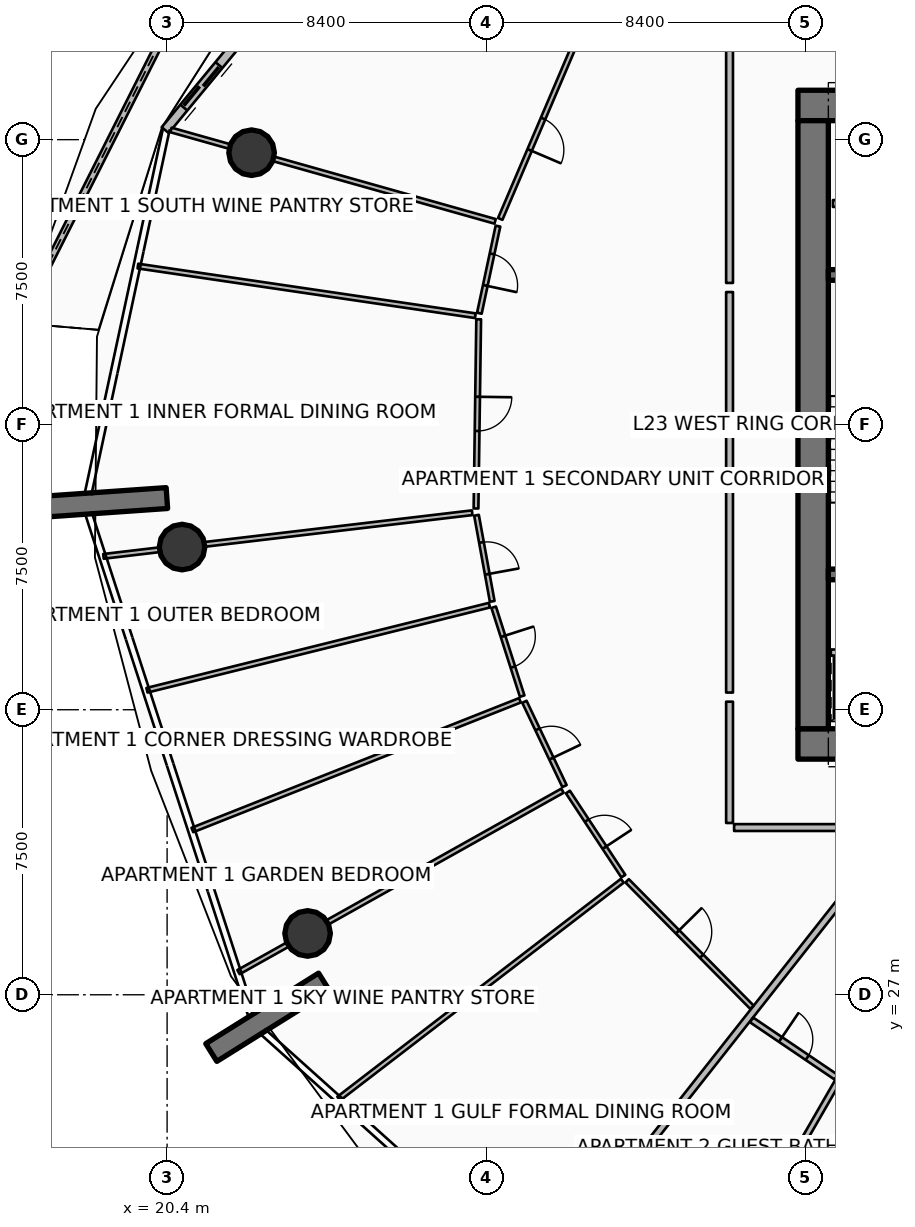
"""IFC4 building model, lengths in metres.
Left out: names, types, materials, properties, quantities, classifications, styles, units other than length and angle.
Written with IfcOpenShell. Run it as: python <this file> out.ifc"""

import sys

from ifc_helpers import new_model, si_unit, direction, frame, frame_2d, origin, origin_2d, place, context, subcontext, project, spatial, polyline, rectangle, circle, outline, extrude, element, fill, save


model = new_model("IFC4")
c1 = context("Model", 3, precision=1e-05, world=origin(), true_north=direction((0.0, 1.0)))
c2 = subcontext(c1, "Body", "Model", "MODEL_VIEW")
j1 = project(units=[si_unit("LENGTHUNIT", "METRE"), si_unit("PLANEANGLEUNIT", "RADIAN")], contexts=[c1])
p1 = place(None, origin())
s1 = spatial("IfcSite", under=j1, at=p1, CompositionType="ELEMENT")
p2 = place(p1, origin())
s2 = spatial("IfcBuilding", under=s1, at=p2, CompositionType="ELEMENT")
p3 = place(p2, frame((0.0, 0.0, 93.9)))
s3 = spatial("IfcBuildingStorey", under=s2, at=p3, CompositionType="ELEMENT", Elevation=93.9)
for number, where, z_axis, x_axis in (
    (1, (37.0, 33.6, 0.0), (0.0, 0.0, 1.0), (1.0, 0.0, 0.0)),
    (2, (37.0, 50.4, 0.0), (0.0, 0.0, 1.0), (1.0, 0.0, 0.0)),
):
    element("IfcWall", number, at=place(p3, frame(where, z_axis=z_axis, x_axis=x_axis)), inside=s3, PredefinedType="SHEAR", context=c2, shape_type="SweptSolid", body=[
        extrude(rectangle(XDim=9.9, YDim=0.8, at=frame_2d((4.95, 0.0))), origin(), (0.0, 0.0, 1.0), 3.75),
    ])
p4 = place(p3, frame((37.4, 34.0, 0.0), z_axis=(0.0, 0.0, 1.0), x_axis=(0.0, 1.0, 0.0)))
e3 = element("IfcWall", 3, at=p4, inside=s3, PredefinedType="SHEAR", context=c2, shape_type="SweptSolid", body=[
    extrude(rectangle(XDim=16.0, YDim=0.8, at=frame_2d((8.0, 0.0))), origin(), (0.0, 0.0, 1.0), 3.75),
])
for number, where, z_axis, x_axis in (
    (4, (37.8, 38.06, 0.0), (0.0, 0.0, 1.0), (1.0, 0.0, 0.0)),
    (5, (37.8, 45.94, 0.0), (0.0, 0.0, 1.0), (1.0, 0.0, 0.0)),
):
    element("IfcWall", number, at=place(p3, frame(where, z_axis=z_axis, x_axis=x_axis)), inside=s3, PredefinedType="SHEAR", context=c2, shape_type="SweptSolid", body=[
        extrude(rectangle(XDim=3.5, YDim=0.28, at=frame_2d((1.75, 0.0))), origin(), (0.0, 0.0, 1.0), 3.75),
    ])
for number, where, z_axis, x_axis in (
    (6, (20.394, 40.07, 0.0), (0.0, 0.0, 1.0), (-0.998, -0.07, 0.0)),
    (7, (24.531, 27.335, 0.0), (0.0, 0.0, 1.0), (-0.848, -0.53, 0.0)),
):
    element("IfcWall", number, at=place(p3, frame(where, z_axis=z_axis, x_axis=x_axis)), inside=s3, PredefinedType="SOLIDWALL", context=c2, shape_type="SweptSolid", body=[
        extrude(rectangle(XDim=3.5, YDim=0.55, at=frame_2d((1.75, 0.0))), origin(), (0.0, 0.0, 1.0), 3.75),
    ])
for number, where, z_axis, x_axis in (
    (8, (22.623, 49.157, 0.0), (0.0, 0.0, 1.0), (1.0, 0.0, 0.0)),
    (9, (20.793, 38.78, 0.0), (0.0, 0.0, 1.0), (1.0, 0.0, 0.0)),
    (10, (24.097, 28.614, 0.0), (0.0, 0.0, 1.0), (1.0, 0.0, 0.0)),
):
    element("IfcColumn", number, at=place(p3, frame(where, z_axis=z_axis, x_axis=x_axis)), inside=s3, PredefinedType="COLUMN", context=c2, shape_type="SweptSolid", body=[
        extrude(circle(Radius=0.6, at=origin_2d()), origin(), (0.0, 0.0, 1.0), 3.5),
    ])
p5 = place(p3, frame((21.802, 55.214, 0.0), z_axis=(0.0, 0.0, 1.0), x_axis=(-0.450016241305, -0.893020370743, 0.0)))
e11 = element("IfcWall", 11, at=p5, inside=s3, PredefinedType="PARAPET", context=c2, shape_type="SweptSolid", body=[
    extrude(outline(polyline([(0.0, 0.0), (11.803, 0.0), (11.803, 1.483), (5.902, 1.284), (0.0, 1.148), (0.0, 0.0)])), frame((0.0, 0.09, 0.0), z_axis=(0.0, -1.0, 0.0), x_axis=(1.0, 0.0, 0.0)), (0.0, 0.0, 1.0), 0.18),
])
p6 = place(p3, frame((27.407, 58.298, 0.0), z_axis=(0.0, 0.0, 1.0), x_axis=(-0.636704975, -0.771107498868, 0.0)))
e12 = element("IfcWall", 12, at=p6, inside=s3, PredefinedType="SOLIDWALL", context=c2, shape_type="SweptSolid", body=[
    extrude(rectangle(XDim=11.084, YDim=0.24, at=frame_2d((5.542, 0.0))), origin(), (0.0, 0.0, 1.0), 2.45),
])
p7 = place(p6, frame((8.864, 0.0, 0.0)))
e13 = element("IfcOpeningElement", 13, at=p7, cuts=e12, PredefinedType="OPENING", context=c2, shape_type="SweptSolid", body=[
    extrude(rectangle(XDim=1.45, YDim=2.15, at=frame_2d((0.725, 1.075))), frame((0.0, 0.13, 0.0), z_axis=(0.0, -1.0, 0.0), x_axis=(1.0, 0.0, 0.0)), (0.0, 0.0, 1.0), 0.26),
])
p8 = place(p6, frame((0.28, 0.0, 0.65)))
e14 = element("IfcOpeningElement", 14, at=p8, cuts=e12, PredefinedType="OPENING", context=c2, shape_type="SweptSolid", body=[
    extrude(rectangle(XDim=1.6, YDim=1.5, at=frame_2d((0.8, 0.75))), frame((0.0, 0.13, 0.0), z_axis=(0.0, -1.0, 0.0), x_axis=(1.0, 0.0, 0.0)), (0.0, 0.0, 1.0), 0.26),
])
p9 = place(p3, frame((37.865, 36.005, 0.0), z_axis=(0.0, 0.0, 1.0), x_axis=(1.0, 0.0, 0.0)))
e15 = element("IfcWall", 15, at=p9, inside=s3, PredefinedType="PARTITIONING", context=c2, shape_type="SweptSolid", body=[
    extrude(rectangle(XDim=2.11, YDim=0.16, at=frame_2d((1.055, 0.0))), origin(), (0.0, 0.0, 1.0), 3.5),
])
p10 = place(p9, frame((0.505, 0.0, 0.0)))
e16 = element("IfcOpeningElement", 16, at=p10, cuts=e15, PredefinedType="OPENING", context=c2, shape_type="SweptSolid", body=[
    extrude(rectangle(XDim=1.1, YDim=2.1, at=frame_2d((0.55, 1.05))), frame((0.0, 0.09, 0.0), z_axis=(0.0, -1.0, 0.0), x_axis=(1.0, 0.0, 0.0)), (0.0, 0.0, 1.0), 0.18),
])
p11 = place(p3, frame((37.92, 47.82, 0.0), z_axis=(0.0, 0.0, 1.0), x_axis=(1.0, 0.0, 0.0)))
e17 = element("IfcWall", 17, at=p11, inside=s3, PredefinedType="PARTITIONING", context=c2, shape_type="SweptSolid", body=[
    extrude(rectangle(XDim=6.26, YDim=0.18, at=frame_2d((3.13, 0.0))), origin(), (0.0, 0.0, 1.0), 3.5),
])
p12 = place(p11, frame((2.705, 0.0, 0.0)))
e18 = element("IfcOpeningElement", 18, at=p12, cuts=e17, PredefinedType="OPENING", context=c2, shape_type="SweptSolid", body=[
    extrude(rectangle(XDim=0.85, YDim=2.06, at=frame_2d((0.425, 1.03))), frame((0.0, 0.1, 0.0), z_axis=(0.0, -1.0, 0.0), x_axis=(1.0, 0.0, 0.0)), (0.0, 0.0, 1.0), 0.2),
])
p13 = place(p3, frame((39.575, 31.314, 0.0), z_axis=(0.0, 0.0, 1.0), x_axis=(-0.619083417853, -0.785325233098, 0.0)))
e19 = element("IfcWall", 19, at=p13, inside=s3, PredefinedType="PARTITIONING", context=c2, shape_type="SweptSolid", body=[
    extrude(rectangle(XDim=15.063, YDim=0.18, at=frame_2d((7.532, 0.0))), origin(), (0.0, 0.0, 1.0), 2.94),
])
p14 = place(p3, frame((35.2, 51.971, 0.0), z_axis=(0.0, 0.0, 1.0), x_axis=(0.0, -1.0, 0.0)))
e20 = element("IfcWall", 20, at=p14, inside=s3, PredefinedType="PARTITIONING", context=c2, shape_type="SweptSolid", body=[
    extrude(rectangle(XDim=6.241, YDim=0.18, at=frame_2d((3.12, 0.0))), origin(), (0.0, 0.0, 1.0), 2.94),
])
p15 = place(p3, frame((31.067, 51.868, 0.0), z_axis=(0.0, 0.0, 1.0), x_axis=(-0.392470533914, -0.919764578579, 0.0)))
e21 = element("IfcWall", 21, at=p15, inside=s3, PredefinedType="PARTITIONING", context=c2, shape_type="SweptSolid", body=[
    extrude(rectangle(XDim=4.842, YDim=0.125, at=frame_2d((2.421, 0.0))), origin(), (0.0, 0.0, 1.0), 2.94),
])
p16 = place(p15, frame((1.971, 0.0, 0.0)))
e22 = element("IfcOpeningElement", 22, at=p16, cuts=e21, PredefinedType="OPENING", context=c2, shape_type="SweptSolid", body=[
    extrude(rectangle(XDim=0.9, YDim=2.08, at=frame_2d((0.45, 1.04))), frame((0.0, 0.073, 0.0), z_axis=(0.0, -1.0, 0.0), x_axis=(1.0, 0.0, 0.0)), (0.0, 0.0, 1.0), 0.145),
])
p17 = place(p3, frame((35.2, 45.49, 0.0), z_axis=(0.0, 0.0, 1.0), x_axis=(0.0, -1.0, 0.0)))
e23 = element("IfcWall", 23, at=p17, inside=s3, PredefinedType="PARTITIONING", context=c2, shape_type="SweptSolid", body=[
    extrude(rectangle(XDim=4.885, YDim=0.18, at=frame_2d((2.442, 0.0))), origin(), (0.0, 0.0, 1.0), 2.94),
])
p18 = place(p3, frame((29.031, 47.35, 0.0), z_axis=(0.0, 0.0, 1.0), x_axis=(-0.962455027906, 0.271441189317, 0.0)))
e24 = element("IfcWall", 24, at=p18, inside=s3, PredefinedType="PARTITIONING", context=c2, shape_type="SweptSolid", body=[
    extrude(rectangle(XDim=8.862, YDim=0.125, at=frame_2d((4.431, 0.0))), origin(), (0.0, 0.0, 1.0), 2.94),
])
p19 = place(p3, frame((28.511, 44.867, 0.0), z_axis=(0.0, 0.0, 1.0), x_axis=(-0.989349459184, 0.145559773332, 0.0)))
e25 = element("IfcWall", 25, at=p19, inside=s3, PredefinedType="PARTITIONING", context=c2, shape_type="SweptSolid", body=[
    extrude(rectangle(XDim=8.975, YDim=0.125, at=frame_2d((4.488, 0.0))), origin(), (0.0, 0.0, 1.0), 2.94),
])
p20 = place(p3, frame((29.106, 47.225, 0.0), z_axis=(0.0, 0.0, 1.0), x_axis=(-0.208839045871, -0.977950025778, 0.0)))
e26 = element("IfcWall", 26, at=p20, inside=s3, PredefinedType="PARTITIONING", context=c2, shape_type="SweptSolid", body=[
    extrude(rectangle(XDim=2.344, YDim=0.125, at=frame_2d((1.172, 0.0))), origin(), (0.0, 0.0, 1.0), 2.94),
])
p21 = place(p20, frame((0.747, 0.0, 0.0)))
e27 = element("IfcOpeningElement", 27, at=p21, cuts=e26, PredefinedType="OPENING", context=c2, shape_type="SweptSolid", body=[
    extrude(rectangle(XDim=0.85, YDim=2.06, at=frame_2d((0.425, 1.03))), frame((0.0, 0.073, 0.0), z_axis=(0.0, -1.0, 0.0), x_axis=(1.0, 0.0, 0.0)), (0.0, 0.0, 1.0), 0.145),
])
p22 = place(p3, frame((28.599, 44.774, 0.0), z_axis=(0.0, 0.0, 1.0), x_axis=(-0.014168717323, -0.999899618687, 0.0)))
e28 = element("IfcWall", 28, at=p22, inside=s3, PredefinedType="PARTITIONING", context=c2, shape_type="SweptSolid", body=[
    extrude(rectangle(XDim=4.98, YDim=0.125, at=frame_2d((2.49, 0.0))), origin(), (0.0, 0.0, 1.0), 2.94),
])
p23 = place(p22, frame((2.04, 0.0, 0.0)))
e29 = element("IfcOpeningElement", 29, at=p23, cuts=e28, PredefinedType="OPENING", context=c2, shape_type="SweptSolid", body=[
    extrude(rectangle(XDim=0.9, YDim=2.08, at=frame_2d((0.45, 1.04))), frame((0.0, 0.073, 0.0), z_axis=(0.0, -1.0, 0.0), x_axis=(1.0, 0.0, 0.0)), (0.0, 0.0, 1.0), 0.145),
])
p24 = place(p3, frame((35.2, 40.365, 0.0), z_axis=(0.0, 0.0, 1.0), x_axis=(0.0, -1.0, 0.0)))
e30 = element("IfcWall", 30, at=p24, inside=s3, PredefinedType="PARTITIONING", context=c2, shape_type="SweptSolid", body=[
    extrude(rectangle(XDim=5.413, YDim=0.18, at=frame_2d((2.707, 0.0))), origin(), (0.0, 0.0, 1.0), 2.94),
])
p25 = place(p3, frame((28.427, 39.683, 0.0), z_axis=(0.0, 0.0, 1.0), x_axis=(-0.993070374036, -0.117521198991, 0.0)))
e31 = element("IfcWall", 31, at=p25, inside=s3, PredefinedType="PARTITIONING", context=c2, shape_type="SweptSolid", body=[
    extrude(rectangle(XDim=9.77, YDim=0.125, at=frame_2d((4.885, 0.0))), origin(), (0.0, 0.0, 1.0), 2.94),
])
p26 = place(p3, frame((28.882, 37.251, 0.0), z_axis=(0.0, 0.0, 1.0), x_axis=(-0.970501778917, -0.241093959111, 0.0)))
e32 = element("IfcWall", 32, at=p26, inside=s3, PredefinedType="PARTITIONING", context=c2, shape_type="SweptSolid", body=[
    extrude(rectangle(XDim=9.286, YDim=0.125, at=frame_2d((4.643, 0.0))), origin(), (0.0, 0.0, 1.0), 2.94),
])
p27 = place(p3, frame((29.684, 34.748, 0.0), z_axis=(0.0, 0.0, 1.0), x_axis=(-0.929782203012, -0.36811011255, 0.0)))
e33 = element("IfcWall", 33, at=p27, inside=s3, PredefinedType="PARTITIONING", context=c2, shape_type="SweptSolid", body=[
    extrude(rectangle(XDim=9.271, YDim=0.125, at=frame_2d((4.635, 0.0))), origin(), (0.0, 0.0, 1.0), 2.94),
])
p28 = place(p3, frame((28.541, 39.616, 0.0), z_axis=(0.0, 0.0, 1.0), x_axis=(0.179631908925, -0.983733895571, 0.0)))
e34 = element("IfcWall", 34, at=p28, inside=s3, PredefinedType="PARTITIONING", context=c2, shape_type="SweptSolid", body=[
    extrude(rectangle(XDim=2.302, YDim=0.125, at=frame_2d((1.151, 0.0))), origin(), (0.0, 0.0, 1.0), 2.94),
])
p29 = place(p28, frame((0.726, 0.0, 0.0)))
e35 = element("IfcOpeningElement", 35, at=p29, cuts=e34, PredefinedType="OPENING", context=c2, shape_type="SweptSolid", body=[
    extrude(rectangle(XDim=0.85, YDim=2.06, at=frame_2d((0.425, 1.03))), frame((0.0, 0.073, 0.0), z_axis=(0.0, -1.0, 0.0), x_axis=(1.0, 0.0, 0.0)), (0.0, 0.0, 1.0), 0.145),
])
p30 = place(p3, frame((28.994, 37.197, 0.0), z_axis=(0.0, 0.0, 1.0), x_axis=(0.305352731689, -0.952239313014, 0.0)))
e36 = element("IfcWall", 36, at=p30, inside=s3, PredefinedType="PARTITIONING", context=c2, shape_type="SweptSolid", body=[
    extrude(rectangle(XDim=2.456, YDim=0.125, at=frame_2d((1.228, 0.0))), origin(), (0.0, 0.0, 1.0), 2.94),
])
p31 = place(p30, frame((0.803, 0.0, 0.0)))
e37 = element("IfcOpeningElement", 37, at=p31, cuts=e36, PredefinedType="OPENING", context=c2, shape_type="SweptSolid", body=[
    extrude(rectangle(XDim=0.85, YDim=2.06, at=frame_2d((0.425, 1.03))), frame((0.0, 0.073, 0.0), z_axis=(0.0, -1.0, 0.0), x_axis=(1.0, 0.0, 0.0)), (0.0, 0.0, 1.0), 0.145),
])
p32 = place(p3, frame((29.802, 34.709, 0.0), z_axis=(0.0, 0.0, 1.0), x_axis=(0.429431892781, -0.90309924674, 0.0)))
e38 = element("IfcWall", 38, at=p32, inside=s3, PredefinedType="PARTITIONING", context=c2, shape_type="SweptSolid", body=[
    extrude(rectangle(XDim=2.456, YDim=0.125, at=frame_2d((1.228, 0.0))), origin(), (0.0, 0.0, 1.0), 2.94),
])
p33 = place(p32, frame((0.803, 0.0, 0.0)))
e39 = element("IfcOpeningElement", 39, at=p33, cuts=e38, PredefinedType="OPENING", context=c2, shape_type="SweptSolid", body=[
    extrude(rectangle(XDim=0.85, YDim=2.06, at=frame_2d((0.425, 1.03))), frame((0.0, 0.073, 0.0), z_axis=(0.0, -1.0, 0.0), x_axis=(1.0, 0.0, 0.0)), (0.0, 0.0, 1.0), 0.145),
])
p34 = place(p3, frame((35.2, 34.712, 0.0), z_axis=(0.0, 0.0, 1.0), x_axis=(0.0, -1.0, 0.0)))
e40 = element("IfcWall", 40, at=p34, inside=s3, PredefinedType="PARTITIONING", context=c2, shape_type="SweptSolid", body=[
    extrude(rectangle(XDim=3.192, YDim=0.18, at=frame_2d((1.596, 0.0))), origin(), (0.0, 0.0, 1.0), 2.94),
])
p35 = place(p3, frame((35.32, 31.4, 0.0), z_axis=(0.0, 0.0, 1.0), x_axis=(1.0, 0.0, 0.0)))
e41 = element("IfcWall", 41, at=p35, inside=s3, PredefinedType="PARTITIONING", context=c2, shape_type="SweptSolid", body=[
    extrude(rectangle(XDim=4.204, YDim=0.18, at=frame_2d((2.102, 0.0))), origin(), (0.0, 0.0, 1.0), 2.94),
])
p36 = place(p3, frame((30.804, 32.37, 0.0), z_axis=(0.0, 0.0, 1.0), x_axis=(-0.872500902675, -0.488612499668, 0.0)))
e42 = element("IfcWall", 42, at=p36, inside=s3, PredefinedType="PARTITIONING", context=c2, shape_type="SweptSolid", body=[
    extrude(rectangle(XDim=9.77, YDim=0.125, at=frame_2d((4.885, 0.0))), origin(), (0.0, 0.0, 1.0), 2.94),
])
p37 = place(p3, frame((32.378, 30.0, 0.0), z_axis=(0.0, 0.0, 1.0), x_axis=(-0.793018359225, -0.609197736315, 0.0)))
e43 = element("IfcWall", 43, at=p37, inside=s3, PredefinedType="PARTITIONING", context=c2, shape_type="SweptSolid", body=[
    extrude(rectangle(XDim=9.409, YDim=0.125, at=frame_2d((4.704, 0.0))), origin(), (0.0, 0.0, 1.0), 2.94),
])
p38 = place(p3, frame((30.946, 32.335, 0.0), z_axis=(0.0, 0.0, 1.0), x_axis=(0.55037901545, -0.83491492941, 0.0)))
e44 = element("IfcWall", 44, at=p38, inside=s3, PredefinedType="PARTITIONING", context=c2, shape_type="SweptSolid", body=[
    extrude(rectangle(XDim=2.651, YDim=0.125, at=frame_2d((1.326, 0.0))), origin(), (0.0, 0.0, 1.0), 2.94),
])
p39 = place(p38, frame((0.901, 0.0, 0.0)))
e45 = element("IfcOpeningElement", 45, at=p39, cuts=e44, PredefinedType="OPENING", context=c2, shape_type="SweptSolid", body=[
    extrude(rectangle(XDim=0.85, YDim=2.06, at=frame_2d((0.425, 1.03))), frame((0.0, 0.073, 0.0), z_axis=(0.0, -1.0, 0.0), x_axis=(1.0, 0.0, 0.0)), (0.0, 0.0, 1.0), 0.145),
])
p40 = place(p3, frame((32.506, 29.998, 0.0), z_axis=(0.0, 0.0, 1.0), x_axis=(0.702626830151, -0.711558527144, 0.0)))
e46 = element("IfcWall", 46, at=p40, inside=s3, PredefinedType="PARTITIONING", context=c2, shape_type="SweptSolid", body=[
    extrude(rectangle(XDim=4.674, YDim=0.125, at=frame_2d((2.337, 0.0))), origin(), (0.0, 0.0, 1.0), 2.94),
])
p41 = place(p40, frame((1.887, 0.0, 0.0)))
e47 = element("IfcOpeningElement", 47, at=p41, cuts=e46, PredefinedType="OPENING", context=c2, shape_type="SweptSolid", body=[
    extrude(rectangle(XDim=0.9, YDim=2.08, at=frame_2d((0.45, 1.04))), frame((0.0, 0.073, 0.0), z_axis=(0.0, -1.0, 0.0), x_axis=(1.0, 0.0, 0.0)), (0.0, 0.0, 1.0), 0.145),
])
p42 = place(p3, frame((35.78, 26.338, 0.0), z_axis=(0.0, 0.0, 1.0), x_axis=(0.828087409359, -0.560599003264, 0.0)))
e48 = element("IfcWall", 48, at=p42, inside=s3, PredefinedType="PARTITIONING", context=c2, shape_type="SweptSolid", body=[
    extrude(rectangle(XDim=2.687, YDim=0.15, at=frame_2d((1.344, 0.0))), origin(), (0.0, 0.0, 1.0), 2.94),
])
p43 = place(p42, frame((0.918, 0.0, 0.0)))
e49 = element("IfcOpeningElement", 49, at=p43, cuts=e48, PredefinedType="OPENING", context=c2, shape_type="SweptSolid", body=[
    extrude(rectangle(XDim=0.85, YDim=2.06, at=frame_2d((0.425, 1.03))), frame((0.0, 0.085, 0.0), z_axis=(0.0, -1.0, 0.0), x_axis=(1.0, 0.0, 0.0)), (0.0, 0.0, 1.0), 0.17),
])
p44 = place(p3, frame((33.167, 23.024, 0.0), z_axis=(0.0, 0.0, 1.0), x_axis=(0.828134847694, -0.560528923459, 0.0)))
e50 = element("IfcWall", 50, at=p44, inside=s3, PredefinedType="PARTITIONING", context=c2, shape_type="SweptSolid", body=[
    extrude(rectangle(XDim=3.298, YDim=0.15, at=frame_2d((1.649, 0.0))), origin(), (0.0, 0.0, 1.0), 2.94),
])
p45 = place(p3, frame((38.035, 24.703, 0.0), z_axis=(0.0, 0.0, 1.0), x_axis=(-0.499227984822, -0.866470668384, 0.0)))
e51 = element("IfcWall", 51, at=p45, inside=s3, PredefinedType="PARTITIONING", context=c2, shape_type="SweptSolid", body=[
    extrude(rectangle(XDim=4.09, YDim=0.15, at=frame_2d((2.045, 0.0))), origin(), (0.0, 0.0, 1.0), 2.94),
])
p46 = place(p7, origin())
e52 = element("IfcDoor", 52, at=p46, inside=s3, OperationType="DOUBLE_DOOR_SLIDING", PredefinedType="DOOR", context=c2, shape_type="SweptSolid", body=[
    extrude(rectangle(XDim=1.45, YDim=2.15, at=frame_2d((0.725, 1.075))), frame((0.0, 0.025, 0.0), z_axis=(0.0, -1.0, 0.0), x_axis=(1.0, 0.0, 0.0)), (0.0, 0.0, 1.0), 0.05),
])
fill(e13, e52)
p47 = place(p16, origin())
e53 = element("IfcDoor", 53, at=p47, inside=s3, OperationType="SINGLE_SWING_RIGHT", PredefinedType="DOOR", context=c2, shape_type="SweptSolid", body=[
    extrude(rectangle(XDim=0.9, YDim=2.08, at=frame_2d((0.45, 1.04))), frame((0.0, 0.025, 0.0), z_axis=(0.0, -1.0, 0.0), x_axis=(1.0, 0.0, 0.0)), (0.0, 0.0, 1.0), 0.05),
])
fill(e22, e53)
p48 = place(p21, origin())
e54 = element("IfcDoor", 54, at=p48, inside=s3, OperationType="SINGLE_SWING_RIGHT", PredefinedType="DOOR", context=c2, shape_type="SweptSolid", body=[
    extrude(rectangle(XDim=0.85, YDim=2.06, at=frame_2d((0.425, 1.03))), frame((0.0, 0.025, 0.0), z_axis=(0.0, -1.0, 0.0), x_axis=(1.0, 0.0, 0.0)), (0.0, 0.0, 1.0), 0.05),
])
fill(e27, e54)
p49 = place(p23, origin())
e55 = element("IfcDoor", 55, at=p49, inside=s3, OperationType="SINGLE_SWING_LEFT", PredefinedType="DOOR", context=c2, shape_type="SweptSolid", body=[
    extrude(rectangle(XDim=0.9, YDim=2.08, at=frame_2d((0.45, 1.04))), frame((0.0, 0.025, 0.0), z_axis=(0.0, -1.0, 0.0), x_axis=(1.0, 0.0, 0.0)), (0.0, 0.0, 1.0), 0.05),
])
fill(e29, e55)
p50 = place(p29, origin())
e56 = element("IfcDoor", 56, at=p50, inside=s3, OperationType="SINGLE_SWING_RIGHT", PredefinedType="DOOR", context=c2, shape_type="SweptSolid", body=[
    extrude(rectangle(XDim=0.85, YDim=2.06, at=frame_2d((0.425, 1.03))), frame((0.0, 0.025, 0.0), z_axis=(0.0, -1.0, 0.0), x_axis=(1.0, 0.0, 0.0)), (0.0, 0.0, 1.0), 0.05),
])
fill(e35, e56)
p51 = place(p31, origin())
e57 = element("IfcDoor", 57, at=p51, inside=s3, OperationType="SINGLE_SWING_LEFT", PredefinedType="DOOR", context=c2, shape_type="SweptSolid", body=[
    extrude(rectangle(XDim=0.85, YDim=2.06, at=frame_2d((0.425, 1.03))), frame((0.0, 0.025, 0.0), z_axis=(0.0, -1.0, 0.0), x_axis=(1.0, 0.0, 0.0)), (0.0, 0.0, 1.0), 0.05),
])
fill(e37, e57)
p52 = place(p33, origin())
e58 = element("IfcDoor", 58, at=p52, inside=s3, OperationType="SINGLE_SWING_RIGHT", PredefinedType="DOOR", context=c2, shape_type="SweptSolid", body=[
    extrude(rectangle(XDim=0.85, YDim=2.06, at=frame_2d((0.425, 1.03))), frame((0.0, 0.025, 0.0), z_axis=(0.0, -1.0, 0.0), x_axis=(1.0, 0.0, 0.0)), (0.0, 0.0, 1.0), 0.05),
])
fill(e39, e58)
p53 = place(p39, origin())
e59 = element("IfcDoor", 59, at=p53, inside=s3, OperationType="SINGLE_SWING_RIGHT", PredefinedType="DOOR", context=c2, shape_type="SweptSolid", body=[
    extrude(rectangle(XDim=0.85, YDim=2.06, at=frame_2d((0.425, 1.03))), frame((0.0, 0.025, 0.0), z_axis=(0.0, -1.0, 0.0), x_axis=(1.0, 0.0, 0.0)), (0.0, 0.0, 1.0), 0.05),
])
fill(e45, e59)
p54 = place(p41, origin())
e60 = element("IfcDoor", 60, at=p54, inside=s3, OperationType="SINGLE_SWING_LEFT", PredefinedType="DOOR", context=c2, shape_type="SweptSolid", body=[
    extrude(rectangle(XDim=0.9, YDim=2.08, at=frame_2d((0.45, 1.04))), frame((0.0, 0.025, 0.0), z_axis=(0.0, -1.0, 0.0), x_axis=(1.0, 0.0, 0.0)), (0.0, 0.0, 1.0), 0.05),
])
fill(e47, e60)
p55 = place(p43, origin())
e61 = element("IfcDoor", 61, at=p55, inside=s3, OperationType="SINGLE_SWING_LEFT", PredefinedType="DOOR", context=c2, shape_type="SweptSolid", body=[
    extrude(rectangle(XDim=0.85, YDim=2.06, at=frame_2d((0.425, 1.03))), frame((0.0, 0.025, 0.0), z_axis=(0.0, -1.0, 0.0), x_axis=(1.0, 0.0, 0.0)), (0.0, 0.0, 1.0), 0.05),
])
fill(e49, e61)
save(model, sys.argv[1])
